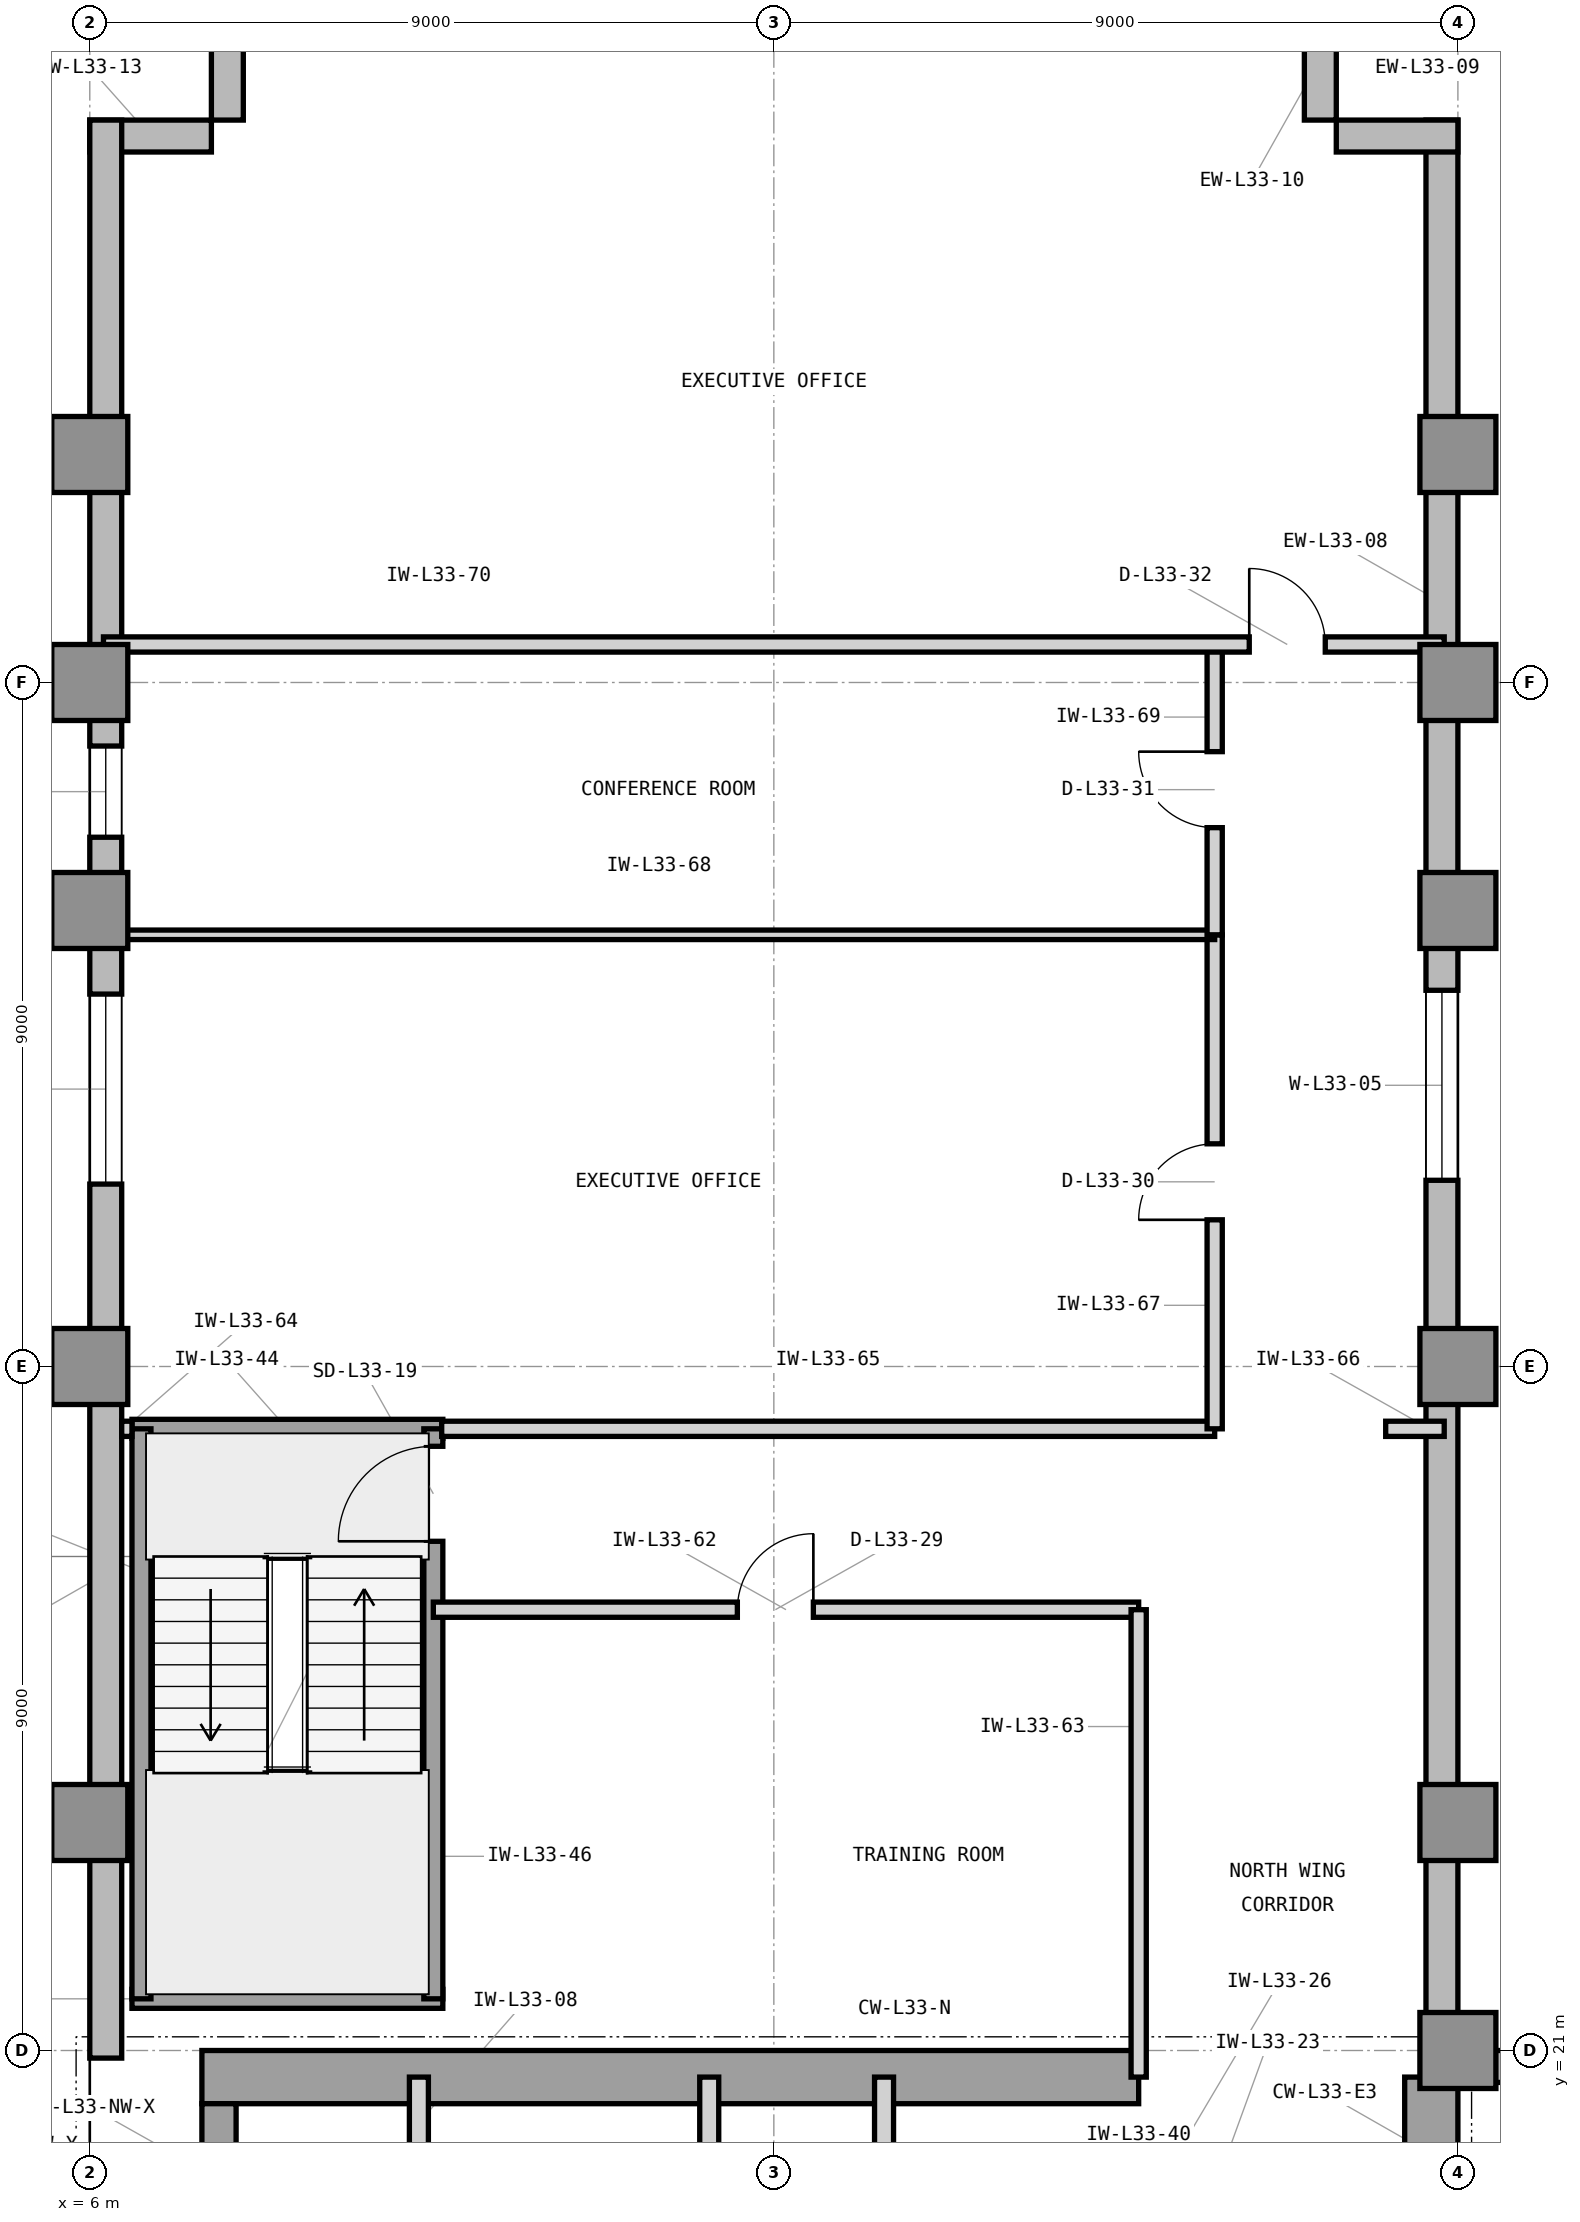
"""IFC4 building model, lengths in metres.
Left out: names, types, materials, properties, quantities, classifications, styles, units other than length and angle.
Written with IfcOpenShell. Run it as: python <this file> out.ifc"""

import sys

from ifc_helpers import new_model, si_unit, direction, frame, frame_2d, origin, origin_2d, place, context, subcontext, project, spatial, rectangle, extrude, element, fill, save


model = new_model("IFC4")
c1 = context("Model", 3, precision=1e-05, world=origin(), true_north=direction((0.0, 1.0)))
c2 = subcontext(c1, "Body", "Model", "MODEL_VIEW")
j1 = project(units=[si_unit("LENGTHUNIT", "METRE"), si_unit("PLANEANGLEUNIT", "RADIAN")], contexts=[c1])
p1 = place(None, origin())
s1 = spatial("IfcSite", under=j1, at=p1, CompositionType="ELEMENT")
p2 = place(p1, origin())
s2 = spatial("IfcBuilding", under=s1, at=p2, CompositionType="ELEMENT")
p3 = place(p2, frame((0.0, 0.0, 140.1)))
s3 = spatial("IfcBuildingStorey", under=s2, at=p3, CompositionType="ELEMENT", Elevation=140.1)
p4 = place(p3, frame((7.475, 20.65, 0.0), z_axis=(0.0, 0.0, 1.0), x_axis=(1.0, 0.0, 0.0)))
e1 = element("IfcWall", 1, at=p4, inside=s3, PredefinedType="SHEAR", context=c2, shape_type="SweptSolid", body=[
    extrude(rectangle(XDim=12.325, YDim=0.7, at=frame_2d((6.163, 0.0))), origin(), (0.0, 0.0, 1.0), 3.9),
])
p5 = place(p3, frame((23.65, 16.6, 0.0), z_axis=(0.0, 0.0, 1.0), x_axis=(0.0, 1.0, 0.0)))
e2 = element("IfcWall", 2, at=p5, inside=s3, PredefinedType="SHEAR", context=c2, shape_type="SweptSolid", body=[
    extrude(rectangle(XDim=4.05, YDim=0.7, at=frame_2d((2.025, 0.0))), origin(), (0.0, 0.0, 1.0), 3.9),
])
p6 = place(p3, frame((7.7, 19.575, 0.0), z_axis=(0.0, 0.0, 1.0), x_axis=(0.0, 1.0, 0.0)))
e3 = element("IfcWall", 3, at=p6, inside=s3, PredefinedType="SHEAR", context=c2, shape_type="SweptSolid", body=[
    extrude(rectangle(XDim=0.725, YDim=0.45, at=frame_2d((0.363, 0.0))), origin(), (0.0, 0.0, 1.0), 3.9),
])
for number, where, z_axis, x_axis in (
    (4, (24.0, 21.0, 0.0), (0.0, 0.0, 1.0), (1.0, 0.0, 0.0)),
    (5, (6.0, 24.0, 0.0), (0.0, 0.0, 1.0), (1.0, 0.0, 0.0)),
    (6, (24.0, 24.0, 0.0), (0.0, 0.0, 1.0), (1.0, 0.0, 0.0)),
    (7, (6.0, 30.0, 0.0), (0.0, 0.0, 1.0), (1.0, 0.0, 0.0)),
    (8, (24.0, 30.0, 0.0), (0.0, 0.0, 1.0), (1.0, 0.0, 0.0)),
    (9, (6.0, 36.0, 0.0), (0.0, 0.0, 1.0), (1.0, 0.0, 0.0)),
    (10, (24.0, 36.0, 0.0), (0.0, 0.0, 1.0), (1.0, 0.0, 0.0)),
    (11, (6.0, 39.0, 0.0), (0.0, 0.0, 1.0), (1.0, 0.0, 0.0)),
    (12, (24.0, 39.0, 0.0), (0.0, 0.0, 1.0), (1.0, 0.0, 0.0)),
    (13, (6.0, 42.0, 0.0), (0.0, 0.0, 1.0), (1.0, 0.0, 0.0)),
    (14, (24.0, 42.0, 0.0), (0.0, 0.0, 1.0), (1.0, 0.0, 0.0)),
):
    element("IfcColumn", number, at=place(p3, frame(where, z_axis=z_axis, x_axis=x_axis)), inside=s3, PredefinedType="COLUMN", context=c2, shape_type="SweptSolid", body=[
        extrude(rectangle(XDim=1.0, YDim=1.0, at=origin_2d()), origin(), (0.0, 0.0, 1.0), 3.9),
    ])
p7 = place(p3, frame((58.4, 20.79, 0.0), z_axis=(0.0, 0.0, 1.0), x_axis=(-1.0, 0.0, 0.0)))
e15 = element("IfcWall", 15, at=p7, inside=s3, PredefinedType="STANDARD", context=c2, shape_type="SweptSolid", body=[
    extrude(rectangle(XDim=34.4, YDim=0.42, at=frame_2d((17.2, 0.0))), origin(), (0.0, 0.0, 1.0), 3.7),
])
p8 = place(p7, frame((20.864, 0.0, 0.85)))
e16 = element("IfcOpeningElement", 16, at=p8, cuts=e15, PredefinedType="OPENING", context=c2, shape_type="SweptSolid", body=[
    extrude(rectangle(XDim=2.5, YDim=2.25, at=frame_2d((1.25, 1.125))), frame((0.0, 0.22, 0.0), z_axis=(0.0, -1.0, 0.0), x_axis=(1.0, 0.0, 0.0)), (0.0, 0.0, 1.0), 0.44),
])
p9 = place(p7, frame((11.386, 0.0, 0.85)))
e17 = element("IfcOpeningElement", 17, at=p9, cuts=e15, PredefinedType="OPENING", context=c2, shape_type="SweptSolid", body=[
    extrude(rectangle(XDim=2.5, YDim=2.25, at=frame_2d((1.25, 1.125))), frame((0.0, 0.22, 0.0), z_axis=(0.0, -1.0, 0.0), x_axis=(1.0, 0.0, 0.0)), (0.0, 0.0, 1.0), 0.44),
])
p10 = place(p3, frame((23.79, 21.0, 0.0), z_axis=(0.0, 0.0, 1.0), x_axis=(0.0, 1.0, 0.0)))
e18 = element("IfcWall", 18, at=p10, inside=s3, PredefinedType="STANDARD", context=c2, shape_type="SweptSolid", body=[
    extrude(rectangle(XDim=25.4, YDim=0.42, at=frame_2d((12.7, 0.0))), origin(), (0.0, 0.0, 1.0), 3.7),
])
p11 = place(p10, frame((11.45, 0.0, 0.85)))
e19 = element("IfcOpeningElement", 19, at=p11, cuts=e18, PredefinedType="OPENING", context=c2, shape_type="SweptSolid", body=[
    extrude(rectangle(XDim=2.5, YDim=2.25, at=frame_2d((1.25, 1.125))), frame((0.0, 0.22, 0.0), z_axis=(0.0, -1.0, 0.0), x_axis=(1.0, 0.0, 0.0)), (0.0, 0.0, 1.0), 0.44),
])
for number, where, z_axis, x_axis in (
    (20, (24.0, 46.19, 0.0), (0.0, 0.0, 1.0), (-1.0, 0.0, 0.0)),
    (21, (22.19, 46.4, 0.0), (0.0, 0.0, 1.0), (0.0, 1.0, 0.0)),
    (22, (7.81, 48.0, 0.0), (0.0, 0.0, 1.0), (0.0, -1.0, 0.0)),
    (23, (7.6, 46.19, 0.0), (0.0, 0.0, 1.0), (-1.0, 0.0, 0.0)),
):
    element("IfcWall", number, at=place(p3, frame(where, z_axis=z_axis, x_axis=x_axis)), inside=s3, PredefinedType="STANDARD", context=c2, shape_type="SweptSolid", body=[
        extrude(rectangle(XDim=1.6, YDim=0.42, at=frame_2d((0.8, 0.0))), origin(), (0.0, 0.0, 1.0), 3.7),
    ])
p12 = place(p3, frame((6.21, 46.4, 0.0), z_axis=(0.0, 0.0, 1.0), x_axis=(0.0, -1.0, 0.0)))
e24 = element("IfcWall", 24, at=p12, inside=s3, PredefinedType="STANDARD", context=c2, shape_type="SweptSolid", body=[
    extrude(rectangle(XDim=25.5, YDim=0.42, at=frame_2d((12.75, 0.0))), origin(), (0.0, 0.0, 1.0), 3.7),
])
p13 = place(p12, frame((11.5, 0.0, 0.85)))
e25 = element("IfcOpeningElement", 25, at=p13, cuts=e24, PredefinedType="OPENING", context=c2, shape_type="SweptSolid", body=[
    extrude(rectangle(XDim=2.5, YDim=2.25, at=frame_2d((1.25, 1.125))), frame((0.0, 0.22, 0.0), z_axis=(0.0, -1.0, 0.0), x_axis=(1.0, 0.0, 0.0)), (0.0, 0.0, 1.0), 0.44),
])
p14 = place(p12, frame((8.236, 0.0, 0.85)))
e26 = element("IfcOpeningElement", 26, at=p14, cuts=e24, PredefinedType="OPENING", context=c2, shape_type="SweptSolid", body=[
    extrude(rectangle(XDim=1.2, YDim=2.25, at=frame_2d((0.6, 1.125))), frame((0.0, 0.22, 0.0), z_axis=(0.0, -1.0, 0.0), x_axis=(1.0, 0.0, 0.0)), (0.0, 0.0, 1.0), 0.44),
])
p15 = place(p3, frame((10.33, 19.45, 0.0), z_axis=(0.0, 0.0, 1.0), x_axis=(0.0, 1.0, 0.0)))
e27 = element("IfcWall", 27, at=p15, inside=s3, PredefinedType="PARTITIONING", context=c2, shape_type="SweptSolid", body=[
    extrude(rectangle(XDim=1.2, YDim=0.25, at=frame_2d((0.6, 0.0))), origin(), (0.0, 0.0, 1.0), 2.994),
])
for number, where, z_axis, x_axis in (
    (28, (14.15, 16.7, 0.0), (0.0, 0.0, 1.0), (0.0, 1.0, 0.0)),
    (29, (16.45, 16.7, 0.0), (0.0, 0.0, 1.0), (0.0, 1.0, 0.0)),
):
    element("IfcWall", number, at=place(p3, frame(where, z_axis=z_axis, x_axis=x_axis)), inside=s3, PredefinedType="PARTITIONING", context=c2, shape_type="SweptSolid", body=[
        extrude(rectangle(XDim=3.95, YDim=0.25, at=frame_2d((1.975, 0.0))), origin(), (0.0, 0.0, 1.0), 3.69),
    ])
for number, where, z_axis, x_axis in (
    (30, (6.555, 21.68, 0.0), (0.0, 0.0, 1.0), (1.0, 0.0, 0.0)),
    (31, (6.555, 29.18, 0.0), (0.0, 0.0, 1.0), (1.0, 0.0, 0.0)),
):
    element("IfcWall", number, at=place(p3, frame(where, z_axis=z_axis, x_axis=x_axis)), inside=s3, PredefinedType="SHEAR", context=c2, shape_type="SweptSolid", body=[
        extrude(rectangle(XDim=4.09, YDim=0.25, at=frame_2d((2.045, 0.0))), origin(), (0.0, 0.0, 1.0), 3.9),
    ])
p16 = place(p3, frame((6.68, 21.68, 0.0), z_axis=(0.0, 0.0, 1.0), x_axis=(0.0, 1.0, 0.0)))
e32 = element("IfcWall", 32, at=p16, inside=s3, PredefinedType="SHEAR", context=c2, shape_type="SweptSolid", body=[
    extrude(rectangle(XDim=7.5, YDim=0.25, at=frame_2d((3.75, 0.0))), origin(), (0.0, 0.0, 1.0), 3.9),
])
p17 = place(p3, frame((10.52, 21.68, 0.0), z_axis=(0.0, 0.0, 1.0), x_axis=(0.0, 1.0, 0.0)))
e33 = element("IfcWall", 33, at=p17, inside=s3, PredefinedType="SHEAR", context=c2, shape_type="SweptSolid", body=[
    extrude(rectangle(XDim=7.5, YDim=0.25, at=frame_2d((3.75, 0.0))), origin(), (0.0, 0.0, 1.0), 3.9),
])
p18 = place(p17, frame((6.02, 0.0, 0.0)))
e34 = element("IfcOpeningElement", 34, at=p18, cuts=e33, PredefinedType="OPENING", context=c2, shape_type="SweptSolid", body=[
    extrude(rectangle(XDim=1.25, YDim=2.2, at=frame_2d((0.625, 1.1))), frame((0.0, 0.135, 0.0), z_axis=(0.0, -1.0, 0.0), x_axis=(1.0, 0.0, 0.0)), (0.0, 0.0, 1.0), 0.27),
])
p19 = place(p3, frame((10.52, 26.8, 0.0), z_axis=(0.0, 0.0, 1.0), x_axis=(1.0, 0.0, 0.0)))
e35 = element("IfcWall", 35, at=p19, inside=s3, PredefinedType="PARTITIONING", context=c2, shape_type="SweptSolid", body=[
    extrude(rectangle(XDim=9.28, YDim=0.2, at=frame_2d((4.64, 0.0))), origin(), (0.0, 0.0, 1.0), 3.69),
])
p20 = place(p19, frame((4.0, 0.0, 0.0)))
e36 = element("IfcOpeningElement", 36, at=p20, cuts=e35, PredefinedType="OPENING", context=c2, shape_type="SweptSolid", body=[
    extrude(rectangle(XDim=1.0, YDim=2.15, at=frame_2d((0.5, 1.075))), frame((0.0, 0.11, 0.0), z_axis=(0.0, -1.0, 0.0), x_axis=(1.0, 0.0, 0.0)), (0.0, 0.0, 1.0), 0.22),
])
p21 = place(p3, frame((19.8, 20.65, 0.0), z_axis=(0.0, 0.0, 1.0), x_axis=(0.0, 1.0, 0.0)))
e37 = element("IfcWall", 37, at=p21, inside=s3, PredefinedType="PARTITIONING", context=c2, shape_type="SweptSolid", body=[
    extrude(rectangle(XDim=6.15, YDim=0.2, at=frame_2d((3.075, 0.0))), origin(), (0.0, 0.0, 1.0), 3.69),
])
p22 = place(p3, frame((6.42, 29.18, 0.0), z_axis=(0.0, 0.0, 1.0), x_axis=(1.0, 0.0, 0.0)))
e38 = element("IfcWall", 38, at=p22, inside=s3, PredefinedType="PARTITIONING", context=c2, shape_type="SweptSolid", body=[
    extrude(rectangle(XDim=0.135, YDim=0.2, at=frame_2d((0.067, 0.0))), origin(), (0.0, 0.0, 1.0), 3.69),
])
p23 = place(p3, frame((10.63, 29.18, 0.0), z_axis=(0.0, 0.0, 1.0), x_axis=(1.0, 0.0, 0.0)))
e39 = element("IfcWall", 39, at=p23, inside=s3, PredefinedType="PARTITIONING", context=c2, shape_type="SweptSolid", body=[
    extrude(rectangle(XDim=10.17, YDim=0.2, at=frame_2d((5.085, 0.0))), origin(), (0.0, 0.0, 1.0), 3.69),
])
p24 = place(p3, frame((23.05, 29.18, 0.0), z_axis=(0.0, 0.0, 1.0), x_axis=(1.0, 0.0, 0.0)))
e40 = element("IfcWall", 40, at=p24, inside=s3, PredefinedType="PARTITIONING", context=c2, shape_type="SweptSolid", body=[
    extrude(rectangle(XDim=0.77, YDim=0.2, at=frame_2d((0.385, 0.0))), origin(), (0.0, 0.0, 1.0), 3.69),
])
p25 = place(p3, frame((20.8, 29.18, 0.0), z_axis=(0.0, 0.0, 1.0), x_axis=(0.0, 1.0, 0.0)))
e41 = element("IfcWall", 41, at=p25, inside=s3, PredefinedType="PARTITIONING", context=c2, shape_type="SweptSolid", body=[
    extrude(rectangle(XDim=6.5, YDim=0.2, at=frame_2d((3.25, 0.0))), origin(), (0.0, 0.0, 1.0), 3.69),
])
p26 = place(p25, frame((2.75, 0.0, 0.0)))
e42 = element("IfcOpeningElement", 42, at=p26, cuts=e41, PredefinedType="OPENING", context=c2, shape_type="SweptSolid", body=[
    extrude(rectangle(XDim=1.0, YDim=2.15, at=frame_2d((0.5, 1.075))), frame((0.0, 0.11, 0.0), z_axis=(0.0, -1.0, 0.0), x_axis=(1.0, 0.0, 0.0)), (0.0, 0.0, 1.0), 0.22),
])
p27 = place(p3, frame((6.18, 35.68, 0.0), z_axis=(0.0, 0.0, 1.0), x_axis=(1.0, 0.0, 0.0)))
e43 = element("IfcWall", 43, at=p27, inside=s3, PredefinedType="PARTITIONING", context=c2, shape_type="SweptSolid", body=[
    extrude(rectangle(XDim=14.62, YDim=0.125, at=frame_2d((7.31, 0.0))), origin(), (0.0, 0.0, 1.0), 3.69),
])
p28 = place(p3, frame((20.8, 35.68, 0.0), z_axis=(0.0, 0.0, 1.0), x_axis=(0.0, 1.0, 0.0)))
e44 = element("IfcWall", 44, at=p28, inside=s3, PredefinedType="PARTITIONING", context=c2, shape_type="SweptSolid", body=[
    extrude(rectangle(XDim=3.82, YDim=0.2, at=frame_2d((1.91, 0.0))), origin(), (0.0, 0.0, 1.0), 3.69),
])
p29 = place(p28, frame((1.41, 0.0, 0.0)))
e45 = element("IfcOpeningElement", 45, at=p29, cuts=e44, PredefinedType="OPENING", context=c2, shape_type="SweptSolid", body=[
    extrude(rectangle(XDim=1.0, YDim=2.15, at=frame_2d((0.5, 1.075))), frame((0.0, 0.11, 0.0), z_axis=(0.0, -1.0, 0.0), x_axis=(1.0, 0.0, 0.0)), (0.0, 0.0, 1.0), 0.22),
])
p30 = place(p3, frame((6.18, 39.5, 0.0), z_axis=(0.0, 0.0, 1.0), x_axis=(1.0, 0.0, 0.0)))
e46 = element("IfcWall", 46, at=p30, inside=s3, PredefinedType="PARTITIONING", context=c2, shape_type="SweptSolid", body=[
    extrude(rectangle(XDim=17.64, YDim=0.2, at=frame_2d((8.82, 0.0))), origin(), (0.0, 0.0, 1.0), 3.69),
])
p31 = place(p30, frame((15.075, 0.0, 0.0)))
e47 = element("IfcOpeningElement", 47, at=p31, cuts=e46, PredefinedType="OPENING", context=c2, shape_type="SweptSolid", body=[
    extrude(rectangle(XDim=1.0, YDim=2.15, at=frame_2d((0.5, 1.075))), frame((0.0, 0.11, 0.0), z_axis=(0.0, -1.0, 0.0), x_axis=(1.0, 0.0, 0.0)), (0.0, 0.0, 1.0), 0.22),
])
p32 = place(p11, origin())
e48 = element("IfcWindow", 48, at=p32, inside=s3, PartitioningType="SINGLE_PANEL", PredefinedType="WINDOW", context=c2, shape_type="SweptSolid", body=[
    extrude(rectangle(XDim=2.5, YDim=2.25, at=frame_2d((1.25, 1.125))), frame((0.0, 0.11, 0.0), z_axis=(0.0, -1.0, 0.0), x_axis=(1.0, 0.0, 0.0)), (0.0, 0.0, 1.0), 0.06),
])
fill(e19, e48)
p33 = place(p13, origin())
e49 = element("IfcWindow", 49, at=p33, inside=s3, PartitioningType="SINGLE_PANEL", PredefinedType="WINDOW", context=c2, shape_type="SweptSolid", body=[
    extrude(rectangle(XDim=2.5, YDim=2.25, at=frame_2d((1.25, 1.125))), frame((0.0, 0.11, 0.0), z_axis=(0.0, -1.0, 0.0), x_axis=(1.0, 0.0, 0.0)), (0.0, 0.0, 1.0), 0.06),
])
fill(e25, e49)
p34 = place(p18, origin())
e50 = element("IfcDoor", 50, at=p34, inside=s3, OperationType="SINGLE_SWING_LEFT", PredefinedType="DOOR", context=c2, shape_type="SweptSolid", body=[
    extrude(rectangle(XDim=1.25, YDim=2.2, at=frame_2d((0.625, 1.1))), frame((0.0, 0.025, 0.0), z_axis=(0.0, -1.0, 0.0), x_axis=(1.0, 0.0, 0.0)), (0.0, 0.0, 1.0), 0.05),
])
fill(e34, e50)
p35 = place(p20, origin())
e51 = element("IfcDoor", 51, at=p35, inside=s3, OperationType="SINGLE_SWING_RIGHT", PredefinedType="DOOR", context=c2, shape_type="SweptSolid", body=[
    extrude(rectangle(XDim=1.0, YDim=2.15, at=frame_2d((0.5, 1.075))), frame((0.0, 0.025, 0.0), z_axis=(0.0, -1.0, 0.0), x_axis=(1.0, 0.0, 0.0)), (0.0, 0.0, 1.0), 0.05),
])
fill(e36, e51)
p36 = place(p26, origin())
e52 = element("IfcDoor", 52, at=p36, inside=s3, OperationType="SINGLE_SWING_LEFT", PredefinedType="DOOR", context=c2, shape_type="SweptSolid", body=[
    extrude(rectangle(XDim=1.0, YDim=2.15, at=frame_2d((0.5, 1.075))), frame((0.0, 0.025, 0.0), z_axis=(0.0, -1.0, 0.0), x_axis=(1.0, 0.0, 0.0)), (0.0, 0.0, 1.0), 0.05),
])
fill(e42, e52)
p37 = place(p29, origin())
e53 = element("IfcDoor", 53, at=p37, inside=s3, OperationType="SINGLE_SWING_RIGHT", PredefinedType="DOOR", context=c2, shape_type="SweptSolid", body=[
    extrude(rectangle(XDim=1.0, YDim=2.15, at=frame_2d((0.5, 1.075))), frame((0.0, 0.025, 0.0), z_axis=(0.0, -1.0, 0.0), x_axis=(1.0, 0.0, 0.0)), (0.0, 0.0, 1.0), 0.05),
])
fill(e45, e53)
p38 = place(p31, origin())
e54 = element("IfcDoor", 54, at=p38, inside=s3, OperationType="SINGLE_SWING_LEFT", PredefinedType="DOOR", context=c2, shape_type="SweptSolid", body=[
    extrude(rectangle(XDim=1.0, YDim=2.15, at=frame_2d((0.5, 1.075))), frame((0.0, 0.025, 0.0), z_axis=(0.0, -1.0, 0.0), x_axis=(1.0, 0.0, 0.0)), (0.0, 0.0, 1.0), 0.05),
])
fill(e47, e54)
p39 = place(p14, origin())
e55 = element("IfcWindow", 55, at=p39, inside=s3, PartitioningType="SINGLE_PANEL", PredefinedType="WINDOW", context=c2, shape_type="SweptSolid", body=[
    extrude(rectangle(XDim=1.2, YDim=2.25, at=frame_2d((0.6, 1.125))), frame((0.0, 0.11, 0.0), z_axis=(0.0, -1.0, 0.0), x_axis=(1.0, 0.0, 0.0)), (0.0, 0.0, 1.0), 0.06),
])
fill(e26, e55)
save(model, sys.argv[1])
